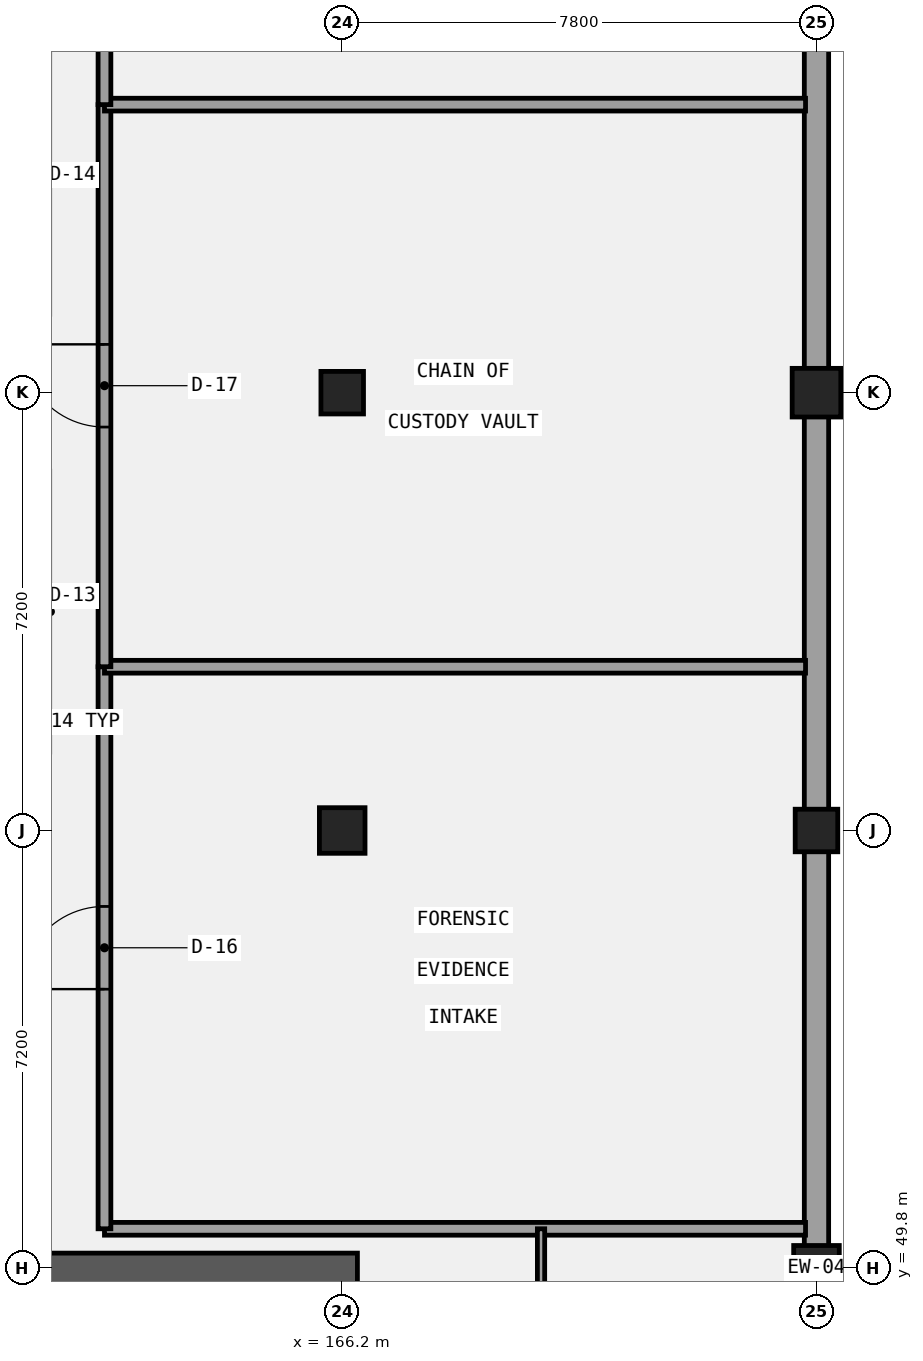
"""IFC4 building model, lengths in metres.
Left out: names, types, materials, properties, quantities, classifications, styles, units other than length and angle.
Written with IfcOpenShell. Run it as: python <this file> out.ifc"""

import sys

from ifc_helpers import new_model, si_unit, direction, frame, frame_2d, origin, origin_2d, place, context, subcontext, project, spatial, rectangle, extrude, element, fill, save


model = new_model("IFC4")
c1 = context("Model", 3, precision=1e-05, world=origin(), true_north=direction((0.0, 1.0)))
c2 = subcontext(c1, "Body", "Model", "MODEL_VIEW")
j1 = project(units=[si_unit("LENGTHUNIT", "METRE"), si_unit("PLANEANGLEUNIT", "RADIAN")], contexts=[c1])
p1 = place(None, origin())
s1 = spatial("IfcSite", under=j1, at=p1, CompositionType="ELEMENT")
p2 = place(p1, origin())
s2 = spatial("IfcBuilding", under=s1, at=p2, CompositionType="ELEMENT")
p3 = place(p2, origin())
s3 = spatial("IfcBuildingStorey", under=s2, at=p3, CompositionType="ELEMENT", Elevation=0.0)
p4 = place(p3, frame((151.55, 49.8, 0.0), z_axis=(0.0, 0.0, 1.0), x_axis=(1.0, 0.0, 0.0)))
e1 = element("IfcWall", 1, at=p4, inside=s3, PredefinedType="SHEAR", context=c2, shape_type="SweptSolid", body=[
    extrude(rectangle(XDim=14.9, YDim=0.5, at=frame_2d((7.45, 0.0))), origin(), (0.0, 0.0, 1.0), 5.4),
])
p5 = place(p3, frame((166.2, 57.0, 0.0), z_axis=(0.0, 0.0, 1.0), x_axis=(1.0, 0.0, 0.0)))
e2 = element("IfcColumn", 2, at=p5, inside=s3, PredefinedType="COLUMN", context=c2, shape_type="SweptSolid", body=[
    extrude(rectangle(XDim=0.75, YDim=0.75, at=origin_2d()), origin(), (0.0, 0.0, 1.0), 5.4),
])
p6 = place(p3, frame((166.2, 64.2, 0.0), z_axis=(0.0, 0.0, 1.0), x_axis=(1.0, 0.0, 0.0)))
e3 = element("IfcColumn", 3, at=p6, inside=s3, PredefinedType="COLUMN", context=c2, shape_type="SweptSolid", body=[
    extrude(rectangle(XDim=0.7, YDim=0.7, at=origin_2d()), origin(), (0.0, 0.0, 1.0), 5.4),
])
p7 = place(p3, frame((174.0, 49.8, -0.32), z_axis=(0.0, 0.0, 1.0), x_axis=(1.0, 0.0, 0.0)))
e4 = element("IfcColumn", 4, at=p7, inside=s3, PredefinedType="COLUMN", context=c2, shape_type="SweptSolid", body=[
    extrude(rectangle(XDim=0.75, YDim=0.75, at=origin_2d()), origin(), (0.0, 0.0, 1.0), 5.72),
])
p8 = place(p3, frame((174.0, 57.0, -0.32), z_axis=(0.0, 0.0, 1.0), x_axis=(1.0, 0.0, 0.0)))
e5 = element("IfcColumn", 5, at=p8, inside=s3, PredefinedType="COLUMN", context=c2, shape_type="SweptSolid", body=[
    extrude(rectangle(XDim=0.7, YDim=0.7, at=origin_2d()), origin(), (0.0, 0.0, 1.0), 5.72),
])
p9 = place(p3, frame((174.0, 64.2, -0.32), z_axis=(0.0, 0.0, 1.0), x_axis=(1.0, 0.0, 0.0)))
e6 = element("IfcColumn", 6, at=p9, inside=s3, PredefinedType="COLUMN", context=c2, shape_type="SweptSolid", body=[
    extrude(rectangle(XDim=0.8, YDim=0.8, at=origin_2d()), origin(), (0.0, 0.0, 1.0), 5.72),
])
p10 = place(p3, frame((174.0, 21.2, 0.0), z_axis=(0.0, 0.0, 1.0), x_axis=(0.0, 1.0, 0.0)))
e7 = element("IfcWall", 7, at=p10, inside=s3, PredefinedType="SOLIDWALL", context=c2, shape_type="SweptSolid", body=[
    extrude(rectangle(XDim=57.2, YDim=0.4, at=frame_2d((28.6, 0.0))), origin(), (0.0, 0.0, 1.0), 4.37),
])
p11 = place(p3, frame((162.29, 50.45, 0.0), z_axis=(0.0, 0.0, 1.0), x_axis=(1.0, 0.0, 0.0)))
e8 = element("IfcWall", 8, at=p11, inside=s3, PredefinedType="PARTITIONING", context=c2, shape_type="SweptSolid", body=[
    extrude(rectangle(XDim=11.53, YDim=0.21, at=frame_2d((5.765, 0.0))), origin(), (0.0, 0.0, 1.0), 5.12),
])
p12 = place(p3, frame((162.29, 50.45, 0.0), z_axis=(0.0, 0.0, 1.0), x_axis=(0.0, 1.0, 0.0)))
e9 = element("IfcWall", 9, at=p12, inside=s3, PredefinedType="PARTITIONING", context=c2, shape_type="SweptSolid", body=[
    extrude(rectangle(XDim=9.243, YDim=0.21, at=frame_2d((4.622, 0.0))), origin(), (0.0, 0.0, 1.0), 5.12),
])
p13 = place(p12, frame((3.941, 0.0, 0.0)))
e10 = element("IfcOpeningElement", 10, at=p13, cuts=e9, PredefinedType="OPENING", context=c2, shape_type="SweptSolid", body=[
    extrude(rectangle(XDim=1.36, YDim=2.1, at=frame_2d((0.68, 1.05))), frame((0.0, 0.115, 0.0), z_axis=(0.0, -1.0, 0.0), x_axis=(1.0, 0.0, 0.0)), (0.0, 0.0, 1.0), 0.23),
])
p14 = place(p3, frame((162.29, 59.693, 0.0), z_axis=(0.0, 0.0, 1.0), x_axis=(1.0, 0.0, 0.0)))
e11 = element("IfcWall", 11, at=p14, inside=s3, PredefinedType="PARTITIONING", context=c2, shape_type="SweptSolid", body=[
    extrude(rectangle(XDim=11.53, YDim=0.21, at=frame_2d((5.765, 0.0))), origin(), (0.0, 0.0, 1.0), 5.12),
])
p15 = place(p3, frame((162.29, 59.693, 0.0), z_axis=(0.0, 0.0, 1.0), x_axis=(0.0, 1.0, 0.0)))
e12 = element("IfcWall", 12, at=p15, inside=s3, PredefinedType="PARTITIONING", context=c2, shape_type="SweptSolid", body=[
    extrude(rectangle(XDim=9.244, YDim=0.21, at=frame_2d((4.622, 0.0))), origin(), (0.0, 0.0, 1.0), 5.12),
])
p16 = place(p15, frame((3.942, 0.0, 0.0)))
e13 = element("IfcOpeningElement", 13, at=p16, cuts=e12, PredefinedType="OPENING", context=c2, shape_type="SweptSolid", body=[
    extrude(rectangle(XDim=1.36, YDim=2.22, at=frame_2d((0.68, 1.11))), frame((0.0, 0.115, 0.0), z_axis=(0.0, -1.0, 0.0), x_axis=(1.0, 0.0, 0.0)), (0.0, 0.0, 1.0), 0.23),
])
p17 = place(p3, frame((162.29, 68.937, 0.0), z_axis=(0.0, 0.0, 1.0), x_axis=(1.0, 0.0, 0.0)))
e14 = element("IfcWall", 14, at=p17, inside=s3, PredefinedType="PARTITIONING", context=c2, shape_type="SweptSolid", body=[
    extrude(rectangle(XDim=11.53, YDim=0.21, at=frame_2d((5.765, 0.0))), origin(), (0.0, 0.0, 1.0), 5.12),
])
p18 = place(p3, frame((162.29, 68.937, 0.0), z_axis=(0.0, 0.0, 1.0), x_axis=(0.0, 1.0, 0.0)))
e15 = element("IfcWall", 15, at=p18, inside=s3, PredefinedType="PARTITIONING", context=c2, shape_type="SweptSolid", body=[
    extrude(rectangle(XDim=9.243, YDim=0.21, at=frame_2d((4.622, 0.0))), origin(), (0.0, 0.0, 1.0), 5.12),
])
p19 = place(p18, frame((3.941, 0.0, 0.0)))
e16 = element("IfcOpeningElement", 16, at=p19, cuts=e15, PredefinedType="OPENING", context=c2, shape_type="SweptSolid", body=[
    extrude(rectangle(XDim=1.36, YDim=2.35, at=frame_2d((0.68, 1.175))), frame((0.0, 0.115, 0.0), z_axis=(0.0, -1.0, 0.0), x_axis=(1.0, 0.0, 0.0)), (0.0, 0.0, 1.0), 0.23),
])
p20 = place(p3, frame((169.47, 37.7, 0.0), z_axis=(0.0, 0.0, 1.0), x_axis=(0.0, 1.0, 0.0)))
e17 = element("IfcWall", 17, at=p20, inside=s3, PredefinedType="PARTITIONING", context=c2, shape_type="SweptSolid", body=[
    extrude(rectangle(XDim=12.75, YDim=0.12, at=frame_2d((6.375, 0.0))), origin(), (0.0, 0.0, 1.0), 5.12),
])
p21 = place(p20, frame((5.915, 0.0, 0.0)))
e18 = element("IfcOpeningElement", 18, at=p21, cuts=e17, PredefinedType="OPENING", context=c2, shape_type="SweptSolid", body=[
    extrude(rectangle(XDim=0.92, YDim=2.22, at=frame_2d((0.46, 1.11))), frame((0.0, 0.07, 0.0), z_axis=(0.0, -1.0, 0.0), x_axis=(1.0, 0.0, 0.0)), (0.0, 0.0, 1.0), 0.14),
])
p22 = place(p13, origin())
e19 = element("IfcDoor", 19, at=p22, inside=s3, OperationType="SINGLE_SWING_LEFT", PredefinedType="DOOR", context=c2, shape_type="SweptSolid", body=[
    extrude(rectangle(XDim=1.36, YDim=2.1, at=frame_2d((0.68, 1.05))), frame((0.0, 0.025, 0.0), z_axis=(0.0, -1.0, 0.0), x_axis=(1.0, 0.0, 0.0)), (0.0, 0.0, 1.0), 0.05),
])
fill(e10, e19)
p23 = place(p16, origin())
e20 = element("IfcDoor", 20, at=p23, inside=s3, OperationType="SINGLE_SWING_RIGHT", PredefinedType="DOOR", context=c2, shape_type="SweptSolid", body=[
    extrude(rectangle(XDim=1.36, YDim=2.22, at=frame_2d((0.68, 1.11))), frame((0.0, 0.025, 0.0), z_axis=(0.0, -1.0, 0.0), x_axis=(1.0, 0.0, 0.0)), (0.0, 0.0, 1.0), 0.05),
])
fill(e13, e20)
save(model, sys.argv[1])
